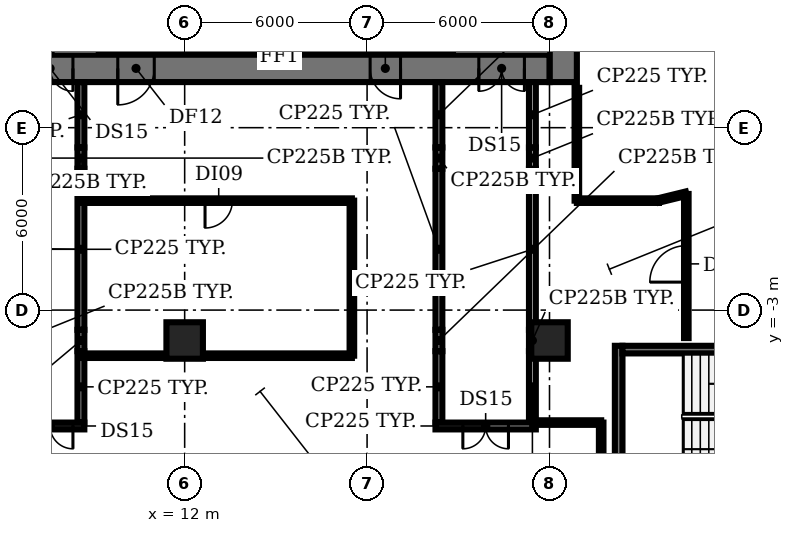
"""IFC4 building model, lengths in metres.
Left out: names, types, materials, properties, quantities, classifications, styles, units other than length and angle.
Written with IfcOpenShell. Run it as: python <this file> out.ifc"""

import sys

from ifc_helpers import new_model, si_unit, direction, frame, frame_2d, origin, origin_2d, place, context, subcontext, project, spatial, rectangle, extrude, element, fill, save


model = new_model("IFC4")
c1 = context("Model", 3, precision=1e-05, world=origin(), true_north=direction((0.0, 1.0)))
c2 = subcontext(c1, "Body", "Model", "MODEL_VIEW")
j1 = project(units=[si_unit("LENGTHUNIT", "METRE"), si_unit("PLANEANGLEUNIT", "RADIAN")], contexts=[c1])
p1 = place(None, origin())
s1 = spatial("IfcSite", under=j1, at=p1, CompositionType="ELEMENT")
p2 = place(p1, origin())
s2 = spatial("IfcBuilding", under=s1, at=p2, CompositionType="ELEMENT")
p3 = place(p2, origin())
s3 = spatial("IfcBuildingStorey", under=s2, at=p3, CompositionType="ELEMENT", Elevation=0.0)
for number, where, z_axis, x_axis in (
    (1, (12.0, -4.0, 0.0), (0.0, 0.0, 1.0), (1.0, 0.0, 0.0)),
    (2, (24.0, -4.0, 0.0), (0.0, 0.0, 1.0), (1.0, 0.0, 0.0)),
):
    element("IfcColumn", number, at=place(p3, frame(where, z_axis=z_axis, x_axis=x_axis)), inside=s3, PredefinedType="COLUMN", context=c2, shape_type="SweptSolid", body=[
        extrude(rectangle(XDim=1.2, YDim=1.2, at=origin_2d()), origin(), (0.0, 0.0, 1.0), 5.65),
    ])
p4 = place(p3, frame((9.275, 11.825, 0.0), z_axis=(0.0, 0.0, 1.0), x_axis=(0.0, -1.0, 0.0)))
e3 = element("IfcWall", 3, at=p4, inside=s3, PredefinedType="SHEAR", context=c2, shape_type="SweptSolid", body=[
    extrude(rectangle(XDim=6.425, YDim=0.25, at=frame_2d((3.212, 0.0))), origin(), (0.0, 0.0, 1.0), 5.65),
])
p5 = place(p4, frame((5.075, 0.0, 0.0)))
e4 = element("IfcOpeningElement", 4, at=p5, cuts=e3, PredefinedType="OPENING", context=c2, shape_type="SweptSolid", body=[
    extrude(rectangle(XDim=1.0, YDim=2.1, at=frame_2d((0.5, 1.05))), frame((0.0, 0.135, 0.0), z_axis=(0.0, -1.0, 0.0), x_axis=(1.0, 0.0, 0.0)), (0.0, 0.0, 1.0), 0.27),
])
p6 = place(p3, frame((13.5, 5.4, 0.0), z_axis=(0.0, 0.0, 1.0), x_axis=(0.0, 1.0, 0.0)))
e5 = element("IfcWall", 5, at=p6, inside=s3, PredefinedType="SHEAR", context=c2, shape_type="SweptSolid", body=[
    extrude(rectangle(XDim=8.2, YDim=0.2, at=frame_2d((4.1, 0.0))), origin(), (0.0, 0.0, 1.0), 5.65),
])
p7 = place(p6, frame((0.75, 0.0, 0.0)))
e6 = element("IfcOpeningElement", 6, at=p7, cuts=e5, PredefinedType="OPENING", context=c2, shape_type="SweptSolid", body=[
    extrude(rectangle(XDim=1.1, YDim=2.1, at=frame_2d((0.55, 1.05))), frame((0.0, 0.11, 0.0), z_axis=(0.0, -1.0, 0.0), x_axis=(1.0, 0.0, 0.0)), (0.0, 0.0, 1.0), 0.22),
])
p8 = place(p6, frame((3.55, 0.0, 0.0)))
e7 = element("IfcOpeningElement", 7, at=p8, cuts=e5, PredefinedType="OPENING", context=c2, shape_type="SweptSolid", body=[
    extrude(rectangle(XDim=1.1, YDim=2.1, at=frame_2d((0.55, 1.05))), frame((0.0, 0.11, 0.0), z_axis=(0.0, -1.0, 0.0), x_axis=(1.0, 0.0, 0.0)), (0.0, 0.0, 1.0), 0.22),
])
p9 = place(p6, frame((6.35, 0.0, 0.0)))
e8 = element("IfcOpeningElement", 8, at=p9, cuts=e5, PredefinedType="OPENING", context=c2, shape_type="SweptSolid", body=[
    extrude(rectangle(XDim=1.1, YDim=2.1, at=frame_2d((0.55, 1.05))), frame((0.0, 0.11, 0.0), z_axis=(0.0, -1.0, 0.0), x_axis=(1.0, 0.0, 0.0)), (0.0, 0.0, 1.0), 0.22),
])
p10 = place(p3, frame((16.5, 5.4, 0.0), z_axis=(0.0, 0.0, 1.0), x_axis=(0.0, 1.0, 0.0)))
e9 = element("IfcWall", 9, at=p10, inside=s3, PredefinedType="SHEAR", context=c2, shape_type="SweptSolid", body=[
    extrude(rectangle(XDim=8.2, YDim=0.2, at=frame_2d((4.1, 0.0))), origin(), (0.0, 0.0, 1.0), 5.65),
])
p11 = place(p3, frame((20.725, 5.4, 0.0), z_axis=(0.0, 0.0, 1.0), x_axis=(0.0, 1.0, 0.0)))
e10 = element("IfcWall", 10, at=p11, inside=s3, PredefinedType="SHEAR", context=c2, shape_type="SweptSolid", body=[
    extrude(rectangle(XDim=8.2, YDim=0.25, at=frame_2d((4.1, 0.0))), origin(), (0.0, 0.0, 1.0), 5.65),
])
p12 = place(p3, frame((24.45, 25.7, 0.0), z_axis=(0.0, 0.0, 1.0), x_axis=(0.0, -1.0, 0.0)))
e11 = element("IfcWall", 11, at=p12, inside=s3, PredefinedType="SHEAR", context=c2, shape_type="SweptSolid", body=[
    extrude(rectangle(XDim=21.2, YDim=0.9, at=frame_2d((10.6, 0.0))), origin(), (0.0, 0.0, 1.0), 5.65),
])
p13 = place(p12, frame((12.45, 0.0, 0.0)))
e12 = element("IfcOpeningElement", 12, at=p13, cuts=e11, PredefinedType="OPENING", context=c2, shape_type="SweptSolid", body=[
    extrude(rectangle(XDim=0.9, YDim=2.1, at=frame_2d((0.45, 1.05))), frame((0.0, 0.46, 0.0), z_axis=(0.0, -1.0, 0.0), x_axis=(1.0, 0.0, 0.0)), (0.0, 0.0, 1.0), 0.92),
])
p14 = place(p12, frame((6.45, 0.0, 0.0)))
e13 = element("IfcOpeningElement", 13, at=p14, cuts=e11, PredefinedType="OPENING", context=c2, shape_type="SweptSolid", body=[
    extrude(rectangle(XDim=2.0, YDim=2.1, at=frame_2d((1.0, 1.05))), frame((0.0, 0.46, 0.0), z_axis=(0.0, -1.0, 0.0), x_axis=(1.0, 0.0, 0.0)), (0.0, 0.0, 1.0), 0.92),
])
p15 = place(p3, frame((24.0, 4.95, 0.0), z_axis=(0.0, 0.0, 1.0), x_axis=(-1.0, 0.0, 0.0)))
e14 = element("IfcWall", 14, at=p15, inside=s3, PredefinedType="SHEAR", context=c2, shape_type="SweptSolid", body=[
    extrude(rectangle(XDim=18.0, YDim=0.9, at=frame_2d((9.0, 0.0))), origin(), (0.0, 0.0, 1.0), 5.65),
])
p16 = place(p15, frame((15.675, 0.0, 0.0)))
e15 = element("IfcOpeningElement", 15, at=p16, cuts=e14, PredefinedType="OPENING", context=c2, shape_type="SweptSolid", body=[
    extrude(rectangle(XDim=1.5, YDim=2.1, at=frame_2d((0.75, 1.05))), frame((0.0, 0.46, 0.0), z_axis=(0.0, -1.0, 0.0), x_axis=(1.0, 0.0, 0.0)), (0.0, 0.0, 1.0), 0.92),
])
p17 = place(p15, frame((0.825, 0.0, 0.0)))
e16 = element("IfcOpeningElement", 16, at=p17, cuts=e14, PredefinedType="OPENING", context=c2, shape_type="SweptSolid", body=[
    extrude(rectangle(XDim=1.5, YDim=2.1, at=frame_2d((0.75, 1.05))), frame((0.0, 0.46, 0.0), z_axis=(0.0, -1.0, 0.0), x_axis=(1.0, 0.0, 0.0)), (0.0, 0.0, 1.0), 0.92),
])
p18 = place(p15, frame((13.0, 0.0, 0.0)))
e17 = element("IfcOpeningElement", 17, at=p18, cuts=e14, PredefinedType="OPENING", context=c2, shape_type="SweptSolid", body=[
    extrude(rectangle(XDim=1.2, YDim=2.1, at=frame_2d((0.6, 1.05))), frame((0.0, 0.46, 0.0), z_axis=(0.0, -1.0, 0.0), x_axis=(1.0, 0.0, 0.0)), (0.0, 0.0, 1.0), 0.92),
])
p19 = place(p15, frame((4.9, 0.0, 0.0)))
e18 = element("IfcOpeningElement", 18, at=p19, cuts=e14, PredefinedType="OPENING", context=c2, shape_type="SweptSolid", body=[
    extrude(rectangle(XDim=1.0, YDim=2.1, at=frame_2d((0.5, 1.05))), frame((0.0, 0.46, 0.0), z_axis=(0.0, -1.0, 0.0), x_axis=(1.0, 0.0, 0.0)), (0.0, 0.0, 1.0), 0.92),
])
p20 = place(p3, frame((26.275, -8.825, 0.0), z_axis=(0.0, 0.0, 1.0), x_axis=(0.0, 1.0, 0.0)))
e19 = element("IfcWall", 19, at=p20, inside=s3, PredefinedType="SHEAR", context=c2, shape_type="SweptSolid", body=[
    extrude(rectangle(XDim=4.65, YDim=0.25, at=frame_2d((2.325, 0.0))), origin(), (0.0, 0.0, 1.0), 5.65),
])
p21 = place(p3, frame((26.4, -4.3, 0.0), z_axis=(0.0, 0.0, 1.0), x_axis=(1.0, 0.0, 0.0)))
e20 = element("IfcWall", 20, at=p21, inside=s3, PredefinedType="SHEAR", context=c2, shape_type="SweptSolid", body=[
    extrude(rectangle(XDim=8.2, YDim=0.25, at=frame_2d((4.1, 0.0))), origin(), (0.0, 0.0, 1.0), 5.65),
])
p22 = place(p3, frame((8.587, -4.35, 0.0), z_axis=(0.0, 0.0, 1.0), x_axis=(0.0, -1.0, 0.0)))
e21 = element("IfcWall", 21, at=p22, inside=s3, PredefinedType="PARTITIONING", context=c2, shape_type="SweptSolid", body=[
    extrude(rectangle(XDim=2.35, YDim=0.225, at=frame_2d((1.175, 0.0))), origin(), (0.0, 0.0, 1.0), 5.65),
])
p23 = place(p3, frame((8.587, -3.65, 0.0), z_axis=(0.0, 0.0, 1.0), x_axis=(0.0, -1.0, 0.0)))
e22 = element("IfcWall", 22, at=p23, inside=s3, PredefinedType="PARTITIONING", context=c2, shape_type="SweptSolid", body=[
    extrude(rectangle(XDim=0.7, YDim=0.225, at=frame_2d((0.35, 0.0))), origin(), (0.0, 0.0, 1.0), 4.65),
])
p24 = place(p3, frame((8.587, 1.65, 0.0), z_axis=(0.0, 0.0, 1.0), x_axis=(0.0, -1.0, 0.0)))
e23 = element("IfcWall", 23, at=p24, inside=s3, PredefinedType="PARTITIONING", context=c2, shape_type="SweptSolid", body=[
    extrude(rectangle(XDim=5.3, YDim=0.225, at=frame_2d((2.65, 0.0))), origin(), (0.0, 0.0, 1.0), 5.65),
])
p25 = place(p3, frame((8.587, 2.35, 0.0), z_axis=(0.0, 0.0, 1.0), x_axis=(0.0, -1.0, 0.0)))
e24 = element("IfcWall", 24, at=p25, inside=s3, PredefinedType="PARTITIONING", context=c2, shape_type="SweptSolid", body=[
    extrude(rectangle(XDim=0.7, YDim=0.225, at=frame_2d((0.35, 0.0))), origin(), (0.0, 0.0, 1.0), 4.65),
])
p26 = place(p3, frame((8.587, 4.5, 0.0), z_axis=(0.0, 0.0, 1.0), x_axis=(0.0, -1.0, 0.0)))
e25 = element("IfcWall", 25, at=p26, inside=s3, PredefinedType="PARTITIONING", context=c2, shape_type="SweptSolid", body=[
    extrude(rectangle(XDim=2.15, YDim=0.225, at=frame_2d((1.075, 0.0))), origin(), (0.0, 0.0, 1.0), 5.65),
])
p27 = place(p3, frame((8.7, -6.812, 0.0), z_axis=(0.0, 0.0, 1.0), x_axis=(-1.0, 0.0, 0.0)))
e26 = element("IfcWall", 26, at=p27, inside=s3, PredefinedType="PARTITIONING", context=c2, shape_type="SweptSolid", body=[
    extrude(rectangle(XDim=2.25, YDim=0.225, at=frame_2d((1.125, 0.0))), origin(), (0.0, 0.0, 1.0), 5.65),
])
p28 = place(p27, frame((0.375, 0.0, 0.0)))
e27 = element("IfcOpeningElement", 27, at=p28, cuts=e26, PredefinedType="OPENING", context=c2, shape_type="SweptSolid", body=[
    extrude(rectangle(XDim=1.5, YDim=2.1, at=frame_2d((0.75, 1.05))), frame((0.0, 0.123, 0.0), z_axis=(0.0, -1.0, 0.0), x_axis=(1.0, 0.0, 0.0)), (0.0, 0.0, 1.0), 0.245),
])
p29 = place(p3, frame((20.363, -6.7, 0.0), z_axis=(0.0, 0.0, 1.0), x_axis=(0.0, 1.0, 0.0)))
e28 = element("IfcWall", 28, at=p29, inside=s3, PredefinedType="PARTITIONING", context=c2, shape_type="SweptSolid", body=[
    extrude(rectangle(XDim=2.35, YDim=0.225, at=frame_2d((1.175, 0.0))), origin(), (0.0, 0.0, 1.0), 5.65),
])
p30 = place(p3, frame((20.363, -4.35, 0.0), z_axis=(0.0, 0.0, 1.0), x_axis=(0.0, 1.0, 0.0)))
e29 = element("IfcWall", 29, at=p30, inside=s3, PredefinedType="PARTITIONING", context=c2, shape_type="SweptSolid", body=[
    extrude(rectangle(XDim=0.7, YDim=0.225, at=frame_2d((0.35, 0.0))), origin(), (0.0, 0.0, 1.0), 4.65),
])
p31 = place(p3, frame((20.363, -3.65, 0.0), z_axis=(0.0, 0.0, 1.0), x_axis=(0.0, 1.0, 0.0)))
e30 = element("IfcWall", 30, at=p31, inside=s3, PredefinedType="PARTITIONING", context=c2, shape_type="SweptSolid", body=[
    extrude(rectangle(XDim=5.3, YDim=0.225, at=frame_2d((2.65, 0.0))), origin(), (0.0, 0.0, 1.0), 5.65),
])
p32 = place(p3, frame((20.363, 1.65, 0.0), z_axis=(0.0, 0.0, 1.0), x_axis=(0.0, 1.0, 0.0)))
e31 = element("IfcWall", 31, at=p32, inside=s3, PredefinedType="PARTITIONING", context=c2, shape_type="SweptSolid", body=[
    extrude(rectangle(XDim=0.7, YDim=0.225, at=frame_2d((0.35, 0.0))), origin(), (0.0, 0.0, 1.0), 4.65),
])
p33 = place(p3, frame((20.363, 2.35, 0.0), z_axis=(0.0, 0.0, 1.0), x_axis=(0.0, 1.0, 0.0)))
e32 = element("IfcWall", 32, at=p33, inside=s3, PredefinedType="PARTITIONING", context=c2, shape_type="SweptSolid", body=[
    extrude(rectangle(XDim=2.15, YDim=0.225, at=frame_2d((1.075, 0.0))), origin(), (0.0, 0.0, 1.0), 5.65),
])
p34 = place(p3, frame((23.438, -4.35, 0.0), z_axis=(0.0, 0.0, 1.0), x_axis=(0.0, -1.0, 0.0)))
e33 = element("IfcWall", 33, at=p34, inside=s3, PredefinedType="PARTITIONING", context=c2, shape_type="SweptSolid", body=[
    extrude(rectangle(XDim=2.35, YDim=0.225, at=frame_2d((1.175, 0.0))), origin(), (0.0, 0.0, 1.0), 5.65),
])
p35 = place(p3, frame((23.438, -3.65, 0.0), z_axis=(0.0, 0.0, 1.0), x_axis=(0.0, -1.0, 0.0)))
e34 = element("IfcWall", 34, at=p35, inside=s3, PredefinedType="PARTITIONING", context=c2, shape_type="SweptSolid", body=[
    extrude(rectangle(XDim=0.7, YDim=0.225, at=frame_2d((0.35, 0.0))), origin(), (0.0, 0.0, 1.0), 4.65),
])
p36 = place(p3, frame((23.438, 1.65, 0.0), z_axis=(0.0, 0.0, 1.0), x_axis=(0.0, -1.0, 0.0)))
e35 = element("IfcWall", 35, at=p36, inside=s3, PredefinedType="PARTITIONING", context=c2, shape_type="SweptSolid", body=[
    extrude(rectangle(XDim=5.3, YDim=0.225, at=frame_2d((2.65, 0.0))), origin(), (0.0, 0.0, 1.0), 5.65),
])
p37 = place(p3, frame((23.438, 2.35, 0.0), z_axis=(0.0, 0.0, 1.0), x_axis=(0.0, -1.0, 0.0)))
e36 = element("IfcWall", 36, at=p37, inside=s3, PredefinedType="PARTITIONING", context=c2, shape_type="SweptSolid", body=[
    extrude(rectangle(XDim=0.7, YDim=0.225, at=frame_2d((0.35, 0.0))), origin(), (0.0, 0.0, 1.0), 4.65),
])
p38 = place(p3, frame((23.438, 4.5, 0.0), z_axis=(0.0, 0.0, 1.0), x_axis=(0.0, -1.0, 0.0)))
e37 = element("IfcWall", 37, at=p38, inside=s3, PredefinedType="PARTITIONING", context=c2, shape_type="SweptSolid", body=[
    extrude(rectangle(XDim=2.15, YDim=0.225, at=frame_2d((1.075, 0.0))), origin(), (0.0, 0.0, 1.0), 5.65),
])
p39 = place(p3, frame((23.55, -6.812, 0.0), z_axis=(0.0, 0.0, 1.0), x_axis=(-1.0, 0.0, 0.0)))
e38 = element("IfcWall", 38, at=p39, inside=s3, PredefinedType="PARTITIONING", context=c2, shape_type="SweptSolid", body=[
    extrude(rectangle(XDim=3.3, YDim=0.225, at=frame_2d((1.65, 0.0))), origin(), (0.0, 0.0, 1.0), 5.65),
])
p40 = place(p39, frame((0.9, 0.0, 0.0)))
e39 = element("IfcOpeningElement", 39, at=p40, cuts=e38, PredefinedType="OPENING", context=c2, shape_type="SweptSolid", body=[
    extrude(rectangle(XDim=1.5, YDim=2.1, at=frame_2d((0.75, 1.05))), frame((0.0, 0.123, 0.0), z_axis=(0.0, -1.0, 0.0), x_axis=(1.0, 0.0, 0.0)), (0.0, 0.0, 1.0), 0.245),
])
p41 = place(p3, frame((8.57, -4.5, 0.0), z_axis=(0.0, 0.0, 1.0), x_axis=(1.0, 0.0, 0.0)))
e40 = element("IfcWall", 40, at=p41, inside=s3, PredefinedType="PARTITIONING", context=c2, shape_type="SweptSolid", body=[
    extrude(rectangle(XDim=2.97, YDim=0.15, at=frame_2d((1.485, 0.0))), origin(), (0.0, 0.0, 1.0), 4.53),
])
p42 = place(p3, frame((12.46, -4.5, 0.0), z_axis=(0.0, 0.0, 1.0), x_axis=(1.0, 0.0, 0.0)))
e41 = element("IfcWall", 41, at=p42, inside=s3, PredefinedType="PARTITIONING", context=c2, shape_type="SweptSolid", body=[
    extrude(rectangle(XDim=5.04, YDim=0.15, at=frame_2d((2.52, 0.0))), origin(), (0.0, 0.0, 1.0), 4.53),
])
p43 = place(p3, frame((17.5, -4.5, 0.0), z_axis=(0.0, 0.0, 1.0), x_axis=(0.0, 1.0, 0.0)))
e42 = element("IfcWall", 42, at=p43, inside=s3, PredefinedType="PARTITIONING", context=c2, shape_type="SweptSolid", body=[
    extrude(rectangle(XDim=5.1, YDim=0.15, at=frame_2d((2.55, 0.0))), origin(), (0.0, 0.0, 1.0), 4.53),
])
p44 = place(p3, frame((17.5, 0.6, 0.0), z_axis=(0.0, 0.0, 1.0), x_axis=(-1.0, 0.0, 0.0)))
e43 = element("IfcWall", 43, at=p44, inside=s3, PredefinedType="PARTITIONING", context=c2, shape_type="SweptSolid", body=[
    extrude(rectangle(XDim=8.93, YDim=0.15, at=frame_2d((4.465, 0.0))), origin(), (0.0, 0.0, 1.0), 4.53),
])
p45 = place(p44, frame((3.93, 0.0, 0.0)))
e44 = element("IfcOpeningElement", 44, at=p45, cuts=e43, PredefinedType="OPENING", context=c2, shape_type="SweptSolid", body=[
    extrude(rectangle(XDim=0.9, YDim=2.1, at=frame_2d((0.45, 1.05))), frame((0.0, 0.085, 0.0), z_axis=(0.0, -1.0, 0.0), x_axis=(1.0, 0.0, 0.0)), (0.0, 0.0, 1.0), 0.17),
])
p46 = place(p3, frame((23.43, -6.7, 0.0), z_axis=(0.0, 0.0, 1.0), x_axis=(1.0, 0.0, 0.0)))
e45 = element("IfcWall", 45, at=p46, inside=s3, PredefinedType="PARTITIONING", context=c2, shape_type="SweptSolid", body=[
    extrude(rectangle(XDim=2.27, YDim=0.15, at=frame_2d((1.135, 0.0))), origin(), (0.0, 0.0, 1.0), 4.53),
])
p47 = place(p3, frame((24.9, 0.6, 0.0), z_axis=(0.0, 0.0, 1.0), x_axis=(0.0, 1.0, 0.0)))
e46 = element("IfcWall", 46, at=p47, inside=s3, PredefinedType="PARTITIONING", context=c2, shape_type="SweptSolid", body=[
    extrude(rectangle(XDim=3.71, YDim=0.15, at=frame_2d((1.855, 0.0))), origin(), (0.0, 0.0, 1.0), 4.53),
])
p48 = place(p3, frame((24.9, 0.6, 0.0), z_axis=(0.0, 0.0, 1.0), x_axis=(1.0, 0.0, 0.0)))
e47 = element("IfcWall", 47, at=p48, inside=s3, PredefinedType="PARTITIONING", context=c2, shape_type="SweptSolid", body=[
    extrude(rectangle(XDim=2.7, YDim=0.15, at=frame_2d((1.35, 0.0))), origin(), (0.0, 0.0, 1.0), 4.53),
])
p49 = place(p3, frame((25.7, -10.03, 0.0), z_axis=(0.0, 0.0, 1.0), x_axis=(0.0, 1.0, 0.0)))
e48 = element("IfcWall", 48, at=p49, inside=s3, PredefinedType="PARTITIONING", context=c2, shape_type="SweptSolid", body=[
    extrude(rectangle(XDim=3.33, YDim=0.15, at=frame_2d((1.665, 0.0))), origin(), (0.0, 0.0, 1.0), 4.53),
])
p50 = place(p3, frame((27.6, 0.61, 0.0), z_axis=(0.0, 0.0, 1.0), x_axis=(0.971400357327, 0.237447564284, 0.0)))
e49 = element("IfcWall", 49, at=p50, inside=s3, PredefinedType="PARTITIONING", context=c2, shape_type="SweptSolid", body=[
    extrude(rectangle(XDim=0.927, YDim=0.15, at=frame_2d((0.463, 0.0))), origin(), (0.0, 0.0, 1.0), 4.53),
])
p51 = place(p3, frame((28.5, -3.92, 0.0), z_axis=(0.0, 0.0, 1.0), x_axis=(0.0, 1.0, 0.0)))
e50 = element("IfcWall", 50, at=p51, inside=s3, PredefinedType="PARTITIONING", context=c2, shape_type="SweptSolid", body=[
    extrude(rectangle(XDim=4.74, YDim=0.15, at=frame_2d((2.37, 0.0))), origin(), (0.0, 0.0, 1.0), 4.53),
])
p52 = place(p51, frame((1.84, 0.0, 0.0)))
e51 = element("IfcOpeningElement", 51, at=p52, cuts=e50, PredefinedType="OPENING", context=c2, shape_type="SweptSolid", body=[
    extrude(rectangle(XDim=1.2, YDim=2.1, at=frame_2d((0.6, 1.05))), frame((0.0, 0.085, 0.0), z_axis=(0.0, -1.0, 0.0), x_axis=(1.0, 0.0, 0.0)), (0.0, 0.0, 1.0), 0.17),
])
p53 = place(p16, origin())
e52 = element("IfcDoor", 52, at=p53, inside=s3, OperationType="DOUBLE_DOOR_SINGLE_SWING", PredefinedType="DOOR", context=c2, shape_type="SweptSolid", body=[
    extrude(rectangle(XDim=1.5, YDim=2.1, at=frame_2d((0.75, 1.05))), frame((0.0, 0.025, 0.0), z_axis=(0.0, -1.0, 0.0), x_axis=(1.0, 0.0, 0.0)), (0.0, 0.0, 1.0), 0.05),
])
fill(e15, e52)
p54 = place(p17, origin())
e53 = element("IfcDoor", 53, at=p54, inside=s3, OperationType="DOUBLE_DOOR_SINGLE_SWING", PredefinedType="DOOR", context=c2, shape_type="SweptSolid", body=[
    extrude(rectangle(XDim=1.5, YDim=2.1, at=frame_2d((0.75, 1.05))), frame((0.0, 0.025, 0.0), z_axis=(0.0, -1.0, 0.0), x_axis=(1.0, 0.0, 0.0)), (0.0, 0.0, 1.0), 0.05),
])
fill(e16, e53)
p55 = place(p18, origin())
e54 = element("IfcDoor", 54, at=p55, inside=s3, OperationType="SINGLE_SWING_RIGHT", PredefinedType="DOOR", context=c2, shape_type="SweptSolid", body=[
    extrude(rectangle(XDim=1.2, YDim=2.1, at=frame_2d((0.6, 1.05))), frame((0.0, 0.025, 0.0), z_axis=(0.0, -1.0, 0.0), x_axis=(1.0, 0.0, 0.0)), (0.0, 0.0, 1.0), 0.05),
])
fill(e17, e54)
p56 = place(p19, origin())
e55 = element("IfcDoor", 55, at=p56, inside=s3, OperationType="SINGLE_SWING_LEFT", PredefinedType="DOOR", context=c2, shape_type="SweptSolid", body=[
    extrude(rectangle(XDim=1.0, YDim=2.1, at=frame_2d((0.5, 1.05))), frame((0.0, -0.39, 0.0), z_axis=(0.0, -1.0, 0.0), x_axis=(1.0, 0.0, 0.0)), (0.0, 0.0, 1.0), 0.05),
])
fill(e18, e55)
p57 = place(p28, origin())
e56 = element("IfcDoor", 56, at=p57, inside=s3, OperationType="DOUBLE_DOOR_SINGLE_SWING", PredefinedType="DOOR", context=c2, shape_type="SweptSolid", body=[
    extrude(rectangle(XDim=1.5, YDim=2.1, at=frame_2d((0.75, 1.05))), frame((0.0, 0.025, 0.0), z_axis=(0.0, -1.0, 0.0), x_axis=(1.0, 0.0, 0.0)), (0.0, 0.0, 1.0), 0.05),
])
fill(e27, e56)
p58 = place(p40, origin())
e57 = element("IfcDoor", 57, at=p58, inside=s3, OperationType="DOUBLE_DOOR_SINGLE_SWING", PredefinedType="DOOR", context=c2, shape_type="SweptSolid", body=[
    extrude(rectangle(XDim=1.5, YDim=2.1, at=frame_2d((0.75, 1.05))), frame((0.0, 0.025, 0.0), z_axis=(0.0, -1.0, 0.0), x_axis=(1.0, 0.0, 0.0)), (0.0, 0.0, 1.0), 0.05),
])
fill(e39, e57)
p59 = place(p45, origin())
e58 = element("IfcDoor", 58, at=p59, inside=s3, OperationType="SINGLE_SWING_RIGHT", PredefinedType="DOOR", context=c2, shape_type="SweptSolid", body=[
    extrude(rectangle(XDim=0.9, YDim=2.1, at=frame_2d((0.45, 1.05))), frame((0.0, 0.025, 0.0), z_axis=(0.0, -1.0, 0.0), x_axis=(1.0, 0.0, 0.0)), (0.0, 0.0, 1.0), 0.05),
])
fill(e44, e58)
p60 = place(p52, origin())
e59 = element("IfcDoor", 59, at=p60, inside=s3, OperationType="SINGLE_SWING_LEFT", PredefinedType="DOOR", context=c2, shape_type="SweptSolid", body=[
    extrude(rectangle(XDim=1.2, YDim=2.1, at=frame_2d((0.6, 1.05))), frame((0.0, 0.025, 0.0), z_axis=(0.0, -1.0, 0.0), x_axis=(1.0, 0.0, 0.0)), (0.0, 0.0, 1.0), 0.05),
])
fill(e51, e59)
save(model, sys.argv[1])
